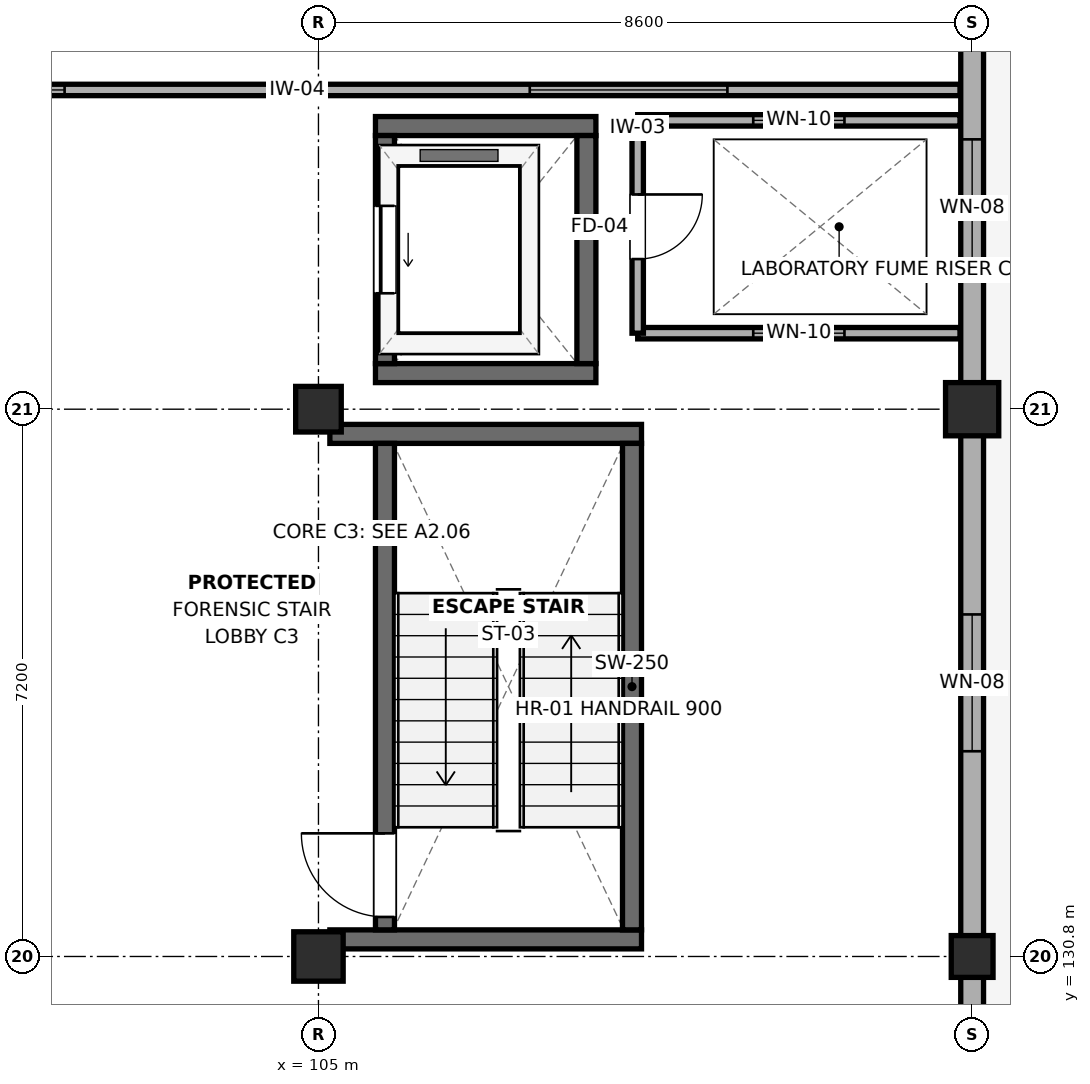
"""IFC4 building model, lengths in metres.
Left out: names, types, materials, properties, quantities, classifications, styles, units other than length and angle.
Written with IfcOpenShell. Run it as: python <this file> out.ifc"""

import sys

from ifc_helpers import new_model, si_unit, direction, frame, frame_2d, origin, origin_2d, place, context, subcontext, project, spatial, rectangle, extrude, element, fill, save


model = new_model("IFC4")
c1 = context("Model", 3, precision=1e-05, world=origin(), true_north=direction((0.0, 1.0)))
c2 = subcontext(c1, "Body", "Model", "MODEL_VIEW")
j1 = project(units=[si_unit("LENGTHUNIT", "METRE"), si_unit("PLANEANGLEUNIT", "RADIAN")], contexts=[c1])
p1 = place(None, origin())
s1 = spatial("IfcSite", under=j1, at=p1, CompositionType="ELEMENT")
p2 = place(p1, origin())
s2 = spatial("IfcBuilding", under=s1, at=p2, CompositionType="ELEMENT")
p3 = place(p2, frame((0.0, 0.0, 4.8)))
s3 = spatial("IfcBuildingStorey", under=s2, at=p3, CompositionType="ELEMENT", Elevation=4.8)
p4 = place(p3, frame((105.0, 130.8, 0.0), z_axis=(0.0, 0.0, 1.0), x_axis=(1.0, 0.0, 0.0)))
e1 = element("IfcColumn", 1, at=p4, inside=s3, PredefinedType="COLUMN", context=c2, shape_type="SweptSolid", body=[
    extrude(rectangle(XDim=0.65, YDim=0.65, at=origin_2d()), origin(), (0.0, 0.0, 1.0), 4.2),
])
p5 = place(p3, frame((105.0, 138.0, 0.0), z_axis=(0.0, 0.0, 1.0), x_axis=(1.0, 0.0, 0.0)))
e2 = element("IfcColumn", 2, at=p5, inside=s3, PredefinedType="COLUMN", context=c2, shape_type="SweptSolid", body=[
    extrude(rectangle(XDim=0.6, YDim=0.6, at=origin_2d()), origin(), (0.0, 0.0, 1.0), 4.2),
])
p6 = place(p3, frame((113.6, 130.8, 0.0), z_axis=(0.0, 0.0, 1.0), x_axis=(1.0, 0.0, 0.0)))
e3 = element("IfcColumn", 3, at=p6, inside=s3, PredefinedType="COLUMN", context=c2, shape_type="SweptSolid", body=[
    extrude(rectangle(XDim=0.55, YDim=0.55, at=origin_2d()), origin(), (0.0, 0.0, 1.0), 4.2),
])
p7 = place(p3, frame((113.6, 138.0, 0.0), z_axis=(0.0, 0.0, 1.0), x_axis=(1.0, 0.0, 0.0)))
e4 = element("IfcColumn", 4, at=p7, inside=s3, PredefinedType="COLUMN", context=c2, shape_type="SweptSolid", body=[
    extrude(rectangle(XDim=0.7, YDim=0.7, at=origin_2d()), origin(), (0.0, 0.0, 1.0), 4.2),
])
for number, where, z_axis, x_axis in (
    (5, (105.15, 131.025, 0.0), (0.0, 0.0, 1.0), (1.0, 0.0, 0.0)),
    (6, (105.15, 137.675, 0.0), (0.0, 0.0, 1.0), (1.0, 0.0, 0.0)),
):
    element("IfcWall", number, at=place(p3, frame(where, z_axis=z_axis, x_axis=x_axis)), inside=s3, PredefinedType="SHEAR", context=c2, shape_type="SweptSolid", body=[
        extrude(rectangle(XDim=4.1, YDim=0.25, at=frame_2d((2.05, 0.0))), origin(), (0.0, 0.0, 1.0), 3.98),
    ])
p8 = place(p3, frame((105.875, 131.15, 0.0), z_axis=(0.0, 0.0, 1.0), x_axis=(0.0, 1.0, 0.0)))
e7 = element("IfcWall", 7, at=p8, inside=s3, PredefinedType="SHEAR", context=c2, shape_type="SweptSolid", body=[
    extrude(rectangle(XDim=6.4, YDim=0.25, at=frame_2d((3.2, 0.0))), origin(), (0.0, 0.0, 1.0), 3.98),
])
p9 = place(p8, frame((0.17, 0.0, 0.0)))
e8 = element("IfcOpeningElement", 8, at=p9, cuts=e7, PredefinedType="OPENING", context=c2, shape_type="SweptSolid", body=[
    extrude(rectangle(XDim=1.1, YDim=2.15, at=frame_2d((0.55, 1.075))), frame((0.0, 0.14, 0.0), z_axis=(0.0, -1.0, 0.0), x_axis=(1.0, 0.0, 0.0)), (0.0, 0.0, 1.0), 0.28),
])
p10 = place(p3, frame((109.125, 131.15, 0.0), z_axis=(0.0, 0.0, 1.0), x_axis=(0.0, 1.0, 0.0)))
e9 = element("IfcWall", 9, at=p10, inside=s3, PredefinedType="SHEAR", context=c2, shape_type="SweptSolid", body=[
    extrude(rectangle(XDim=6.4, YDim=0.25, at=frame_2d((3.2, 0.0))), origin(), (0.0, 0.0, 1.0), 3.98),
])
for number, where, z_axis, x_axis in (
    (10, (105.75, 138.475, 0.0), (0.0, 0.0, 1.0), (1.0, 0.0, 0.0)),
    (11, (105.75, 141.725, 0.0), (0.0, 0.0, 1.0), (1.0, 0.0, 0.0)),
):
    element("IfcWall", number, at=place(p3, frame(where, z_axis=z_axis, x_axis=x_axis)), inside=s3, PredefinedType="SHEAR", context=c2, shape_type="SweptSolid", body=[
        extrude(rectangle(XDim=2.9, YDim=0.25, at=frame_2d((1.45, 0.0))), origin(), (0.0, 0.0, 1.0), 3.98),
    ])
p11 = place(p3, frame((105.875, 138.6, 0.0), z_axis=(0.0, 0.0, 1.0), x_axis=(0.0, 1.0, 0.0)))
e12 = element("IfcWall", 12, at=p11, inside=s3, PredefinedType="SHEAR", context=c2, shape_type="SweptSolid", body=[
    extrude(rectangle(XDim=3.0, YDim=0.25, at=frame_2d((1.5, 0.0))), origin(), (0.0, 0.0, 1.0), 3.98),
])
p12 = place(p11, frame((0.925, 0.0, 0.0)))
e13 = element("IfcOpeningElement", 13, at=p12, cuts=e12, PredefinedType="OPENING", context=c2, shape_type="SweptSolid", body=[
    extrude(rectangle(XDim=1.15, YDim=2.15, at=frame_2d((0.575, 1.075))), frame((0.0, 0.14, 0.0), z_axis=(0.0, -1.0, 0.0), x_axis=(1.0, 0.0, 0.0)), (0.0, 0.0, 1.0), 0.28),
])
p13 = place(p3, frame((108.525, 138.6, 0.0), z_axis=(0.0, 0.0, 1.0), x_axis=(0.0, 1.0, 0.0)))
e14 = element("IfcWall", 14, at=p13, inside=s3, PredefinedType="SHEAR", context=c2, shape_type="SweptSolid", body=[
    extrude(rectangle(XDim=3.0, YDim=0.25, at=frame_2d((1.5, 0.0))), origin(), (0.0, 0.0, 1.0), 3.98),
])
p14 = place(p3, frame((113.6, 122.4, 0.0), z_axis=(0.0, 0.0, 1.0), x_axis=(0.0, 1.0, 0.0)))
e15 = element("IfcWall", 15, at=p14, inside=s3, PredefinedType="SOLIDWALL", context=c2, shape_type="SweptSolid", body=[
    extrude(rectangle(XDim=8.4, YDim=0.3, at=frame_2d((4.2, 0.0))), origin(), (0.0, 0.0, 1.0), 3.535),
])
p15 = place(p14, frame((1.352, 0.0, 1.1)))
e16 = element("IfcOpeningElement", 16, at=p15, cuts=e15, PredefinedType="OPENING", context=c2, shape_type="SweptSolid", body=[
    extrude(rectangle(XDim=2.0, YDim=1.8, at=frame_2d((1.0, 0.9))), frame((0.0, 0.165, 0.0), z_axis=(0.0, -1.0, 0.0), x_axis=(1.0, 0.0, 0.0)), (0.0, 0.0, 1.0), 0.33),
])
p16 = place(p14, frame((5.048, 0.0, 1.1)))
e17 = element("IfcOpeningElement", 17, at=p16, cuts=e15, PredefinedType="OPENING", context=c2, shape_type="SweptSolid", body=[
    extrude(rectangle(XDim=2.0, YDim=1.8, at=frame_2d((1.0, 0.9))), frame((0.0, 0.165, 0.0), z_axis=(0.0, -1.0, 0.0), x_axis=(1.0, 0.0, 0.0)), (0.0, 0.0, 1.0), 0.33),
])
p17 = place(p3, frame((113.6, 130.8, 0.0), z_axis=(0.0, 0.0, 1.0), x_axis=(0.0, 1.0, 0.0)))
e18 = element("IfcWall", 18, at=p17, inside=s3, PredefinedType="SOLIDWALL", context=c2, shape_type="SweptSolid", body=[
    extrude(rectangle(XDim=7.2, YDim=0.3, at=frame_2d((3.6, 0.0))), origin(), (0.0, 0.0, 1.0), 3.525),
])
p18 = place(p17, frame((2.7, 0.0, 1.1)))
e19 = element("IfcOpeningElement", 19, at=p18, cuts=e18, PredefinedType="OPENING", context=c2, shape_type="SweptSolid", body=[
    extrude(rectangle(XDim=1.8, YDim=1.2, at=frame_2d((0.9, 0.6))), frame((0.0, 0.165, 0.0), z_axis=(0.0, -1.0, 0.0), x_axis=(1.0, 0.0, 0.0)), (0.0, 0.0, 1.0), 0.33),
])
p19 = place(p3, frame((113.6, 138.0, 0.0), z_axis=(0.0, 0.0, 1.0), x_axis=(0.0, 1.0, 0.0)))
e20 = element("IfcWall", 20, at=p19, inside=s3, PredefinedType="SOLIDWALL", context=c2, shape_type="SweptSolid", body=[
    extrude(rectangle(XDim=7.2, YDim=0.3, at=frame_2d((3.6, 0.0))), origin(), (0.0, 0.0, 1.0), 3.625),
])
p20 = place(p19, frame((1.75, 0.0, 1.1)))
e21 = element("IfcOpeningElement", 21, at=p20, cuts=e20, PredefinedType="OPENING", context=c2, shape_type="SweptSolid", body=[
    extrude(rectangle(XDim=1.8, YDim=1.2, at=frame_2d((0.9, 0.6))), frame((0.0, 0.165, 0.0), z_axis=(0.0, -1.0, 0.0), x_axis=(1.0, 0.0, 0.0)), (0.0, 0.0, 1.0), 0.33),
])
p21 = place(p3, frame((109.2, 139.0, 0.0), z_axis=(0.0, 0.0, 1.0), x_axis=(1.0, 0.0, 0.0)))
e22 = element("IfcWall", 22, at=p21, inside=s3, PredefinedType="PARTITIONING", context=c2, shape_type="SweptSolid", body=[
    extrude(rectangle(XDim=4.24, YDim=0.15, at=frame_2d((2.12, 0.0))), origin(), (0.0, 0.0, 1.0), 3.625),
])
p22 = place(p21, frame((1.52, 0.0, 0.95)))
e23 = element("IfcOpeningElement", 23, at=p22, cuts=e22, PredefinedType="OPENING", context=c2, shape_type="SweptSolid", body=[
    extrude(rectangle(XDim=1.2, YDim=1.5, at=frame_2d((0.6, 0.75))), frame((0.0, 0.09, 0.0), z_axis=(0.0, -1.0, 0.0), x_axis=(1.0, 0.0, 0.0)), (0.0, 0.0, 1.0), 0.18),
])
p23 = place(p3, frame((109.2, 141.8, 0.0), z_axis=(0.0, 0.0, 1.0), x_axis=(1.0, 0.0, 0.0)))
e24 = element("IfcWall", 24, at=p23, inside=s3, PredefinedType="PARTITIONING", context=c2, shape_type="SweptSolid", body=[
    extrude(rectangle(XDim=4.24, YDim=0.15, at=frame_2d((2.12, 0.0))), origin(), (0.0, 0.0, 1.0), 3.625),
])
p24 = place(p23, frame((1.52, 0.0, 0.95)))
e25 = element("IfcOpeningElement", 25, at=p24, cuts=e24, PredefinedType="OPENING", context=c2, shape_type="SweptSolid", body=[
    extrude(rectangle(XDim=1.2, YDim=1.5, at=frame_2d((0.6, 0.75))), frame((0.0, 0.09, 0.0), z_axis=(0.0, -1.0, 0.0), x_axis=(1.0, 0.0, 0.0)), (0.0, 0.0, 1.0), 0.18),
])
p25 = place(p3, frame((109.2, 139.0, 0.0), z_axis=(0.0, 0.0, 1.0), x_axis=(0.0, 1.0, 0.0)))
e26 = element("IfcWall", 26, at=p25, inside=s3, PredefinedType="PARTITIONING", context=c2, shape_type="SweptSolid", body=[
    extrude(rectangle(XDim=2.8, YDim=0.15, at=frame_2d((1.4, 0.0))), origin(), (0.0, 0.0, 1.0), 3.975),
])
p26 = place(p25, frame((0.975, 0.0, 0.0)))
e27 = element("IfcOpeningElement", 27, at=p26, cuts=e26, PredefinedType="OPENING", context=c2, shape_type="SweptSolid", body=[
    extrude(rectangle(XDim=0.85, YDim=2.1, at=frame_2d((0.425, 1.05))), frame((0.0, 0.09, 0.0), z_axis=(0.0, -1.0, 0.0), x_axis=(1.0, 0.0, 0.0)), (0.0, 0.0, 1.0), 0.18),
])
p27 = place(p3, frame((96.0, 142.2, 0.0), z_axis=(0.0, 0.0, 1.0), x_axis=(1.0, 0.0, 0.0)))
e28 = element("IfcWall", 28, at=p27, inside=s3, PredefinedType="PARTITIONING", context=c2, shape_type="SweptSolid", body=[
    extrude(rectangle(XDim=17.44, YDim=0.15, at=frame_2d((8.72, 0.0))), origin(), (0.0, 0.0, 1.0), 3.425),
])
p28 = place(p27, frame((3.06, 0.0, 0.95)))
e29 = element("IfcOpeningElement", 29, at=p28, cuts=e28, PredefinedType="OPENING", context=c2, shape_type="SweptSolid", body=[
    extrude(rectangle(XDim=2.6, YDim=1.5, at=frame_2d((1.3, 0.75))), frame((0.0, 0.09, 0.0), z_axis=(0.0, -1.0, 0.0), x_axis=(1.0, 0.0, 0.0)), (0.0, 0.0, 1.0), 0.18),
])
p29 = place(p27, frame((11.78, 0.0, 0.95)))
e30 = element("IfcOpeningElement", 30, at=p29, cuts=e28, PredefinedType="OPENING", context=c2, shape_type="SweptSolid", body=[
    extrude(rectangle(XDim=2.6, YDim=1.5, at=frame_2d((1.3, 0.75))), frame((0.0, 0.09, 0.0), z_axis=(0.0, -1.0, 0.0), x_axis=(1.0, 0.0, 0.0)), (0.0, 0.0, 1.0), 0.18),
])
p30 = place(p18, origin())
e31 = element("IfcWindow", 31, at=p30, inside=s3, PartitioningType="SINGLE_PANEL", PredefinedType="WINDOW", context=c2, shape_type="SweptSolid", body=[
    extrude(rectangle(XDim=1.8, YDim=1.2, at=frame_2d((0.9, 0.6))), frame((0.0, 0.03, 0.0), z_axis=(0.0, -1.0, 0.0), x_axis=(1.0, 0.0, 0.0)), (0.0, 0.0, 1.0), 0.06),
])
fill(e19, e31)
p31 = place(p20, origin())
e32 = element("IfcWindow", 32, at=p31, inside=s3, PartitioningType="SINGLE_PANEL", PredefinedType="WINDOW", context=c2, shape_type="SweptSolid", body=[
    extrude(rectangle(XDim=1.8, YDim=1.2, at=frame_2d((0.9, 0.6))), frame((0.0, 0.03, 0.0), z_axis=(0.0, -1.0, 0.0), x_axis=(1.0, 0.0, 0.0)), (0.0, 0.0, 1.0), 0.06),
])
fill(e21, e32)
p32 = place(p9, origin())
e33 = element("IfcDoor", 33, at=p32, inside=s3, OperationType="SINGLE_SWING_RIGHT", PredefinedType="DOOR", context=c2, shape_type="SweptSolid", body=[
    extrude(rectangle(XDim=1.1, YDim=2.15, at=frame_2d((0.55, 1.075))), frame((0.0, 0.025, 0.0), z_axis=(0.0, -1.0, 0.0), x_axis=(1.0, 0.0, 0.0)), (0.0, 0.0, 1.0), 0.05),
])
fill(e8, e33)
p33 = place(p12, origin())
e34 = element("IfcDoor", 34, at=p33, inside=s3, OperationType="SLIDING_TO_LEFT", PredefinedType="DOOR", context=c2, shape_type="SweptSolid", body=[
    extrude(rectangle(XDim=1.15, YDim=2.15, at=frame_2d((0.575, 1.075))), frame((0.0, 0.025, 0.0), z_axis=(0.0, -1.0, 0.0), x_axis=(1.0, 0.0, 0.0)), (0.0, 0.0, 1.0), 0.05),
])
fill(e13, e34)
p34 = place(p22, origin())
e35 = element("IfcWindow", 35, at=p34, inside=s3, PartitioningType="SINGLE_PANEL", PredefinedType="WINDOW", context=c2, shape_type="SweptSolid", body=[
    extrude(rectangle(XDim=1.2, YDim=1.5, at=frame_2d((0.6, 0.75))), frame((0.0, 0.03, 0.0), z_axis=(0.0, -1.0, 0.0), x_axis=(1.0, 0.0, 0.0)), (0.0, 0.0, 1.0), 0.06),
])
fill(e23, e35)
p35 = place(p24, origin())
e36 = element("IfcWindow", 36, at=p35, inside=s3, PartitioningType="SINGLE_PANEL", PredefinedType="WINDOW", context=c2, shape_type="SweptSolid", body=[
    extrude(rectangle(XDim=1.2, YDim=1.5, at=frame_2d((0.6, 0.75))), frame((0.0, 0.03, 0.0), z_axis=(0.0, -1.0, 0.0), x_axis=(1.0, 0.0, 0.0)), (0.0, 0.0, 1.0), 0.06),
])
fill(e25, e36)
p36 = place(p26, frame((0.85, 0.0, 0.0), z_axis=(0.0, 0.0, 1.0), x_axis=(-1.0, 0.0, 0.0)))
e37 = element("IfcDoor", 37, at=p36, inside=s3, OperationType="SINGLE_SWING_LEFT", PredefinedType="DOOR", context=c2, shape_type="SweptSolid", body=[
    extrude(rectangle(XDim=0.85, YDim=2.1, at=frame_2d((0.425, 1.05))), frame((0.0, 0.025, 0.0), z_axis=(0.0, -1.0, 0.0), x_axis=(1.0, 0.0, 0.0)), (0.0, 0.0, 1.0), 0.05),
])
fill(e27, e37)
p37 = place(p28, origin())
e38 = element("IfcWindow", 38, at=p37, inside=s3, PartitioningType="SINGLE_PANEL", PredefinedType="WINDOW", context=c2, shape_type="SweptSolid", body=[
    extrude(rectangle(XDim=2.6, YDim=1.5, at=frame_2d((1.3, 0.75))), frame((0.0, 0.03, 0.0), z_axis=(0.0, -1.0, 0.0), x_axis=(1.0, 0.0, 0.0)), (0.0, 0.0, 1.0), 0.06),
])
fill(e29, e38)
p38 = place(p29, origin())
e39 = element("IfcWindow", 39, at=p38, inside=s3, PartitioningType="SINGLE_PANEL", PredefinedType="WINDOW", context=c2, shape_type="SweptSolid", body=[
    extrude(rectangle(XDim=2.6, YDim=1.5, at=frame_2d((1.3, 0.75))), frame((0.0, 0.03, 0.0), z_axis=(0.0, -1.0, 0.0), x_axis=(1.0, 0.0, 0.0)), (0.0, 0.0, 1.0), 0.06),
])
fill(e30, e39)
save(model, sys.argv[1])
